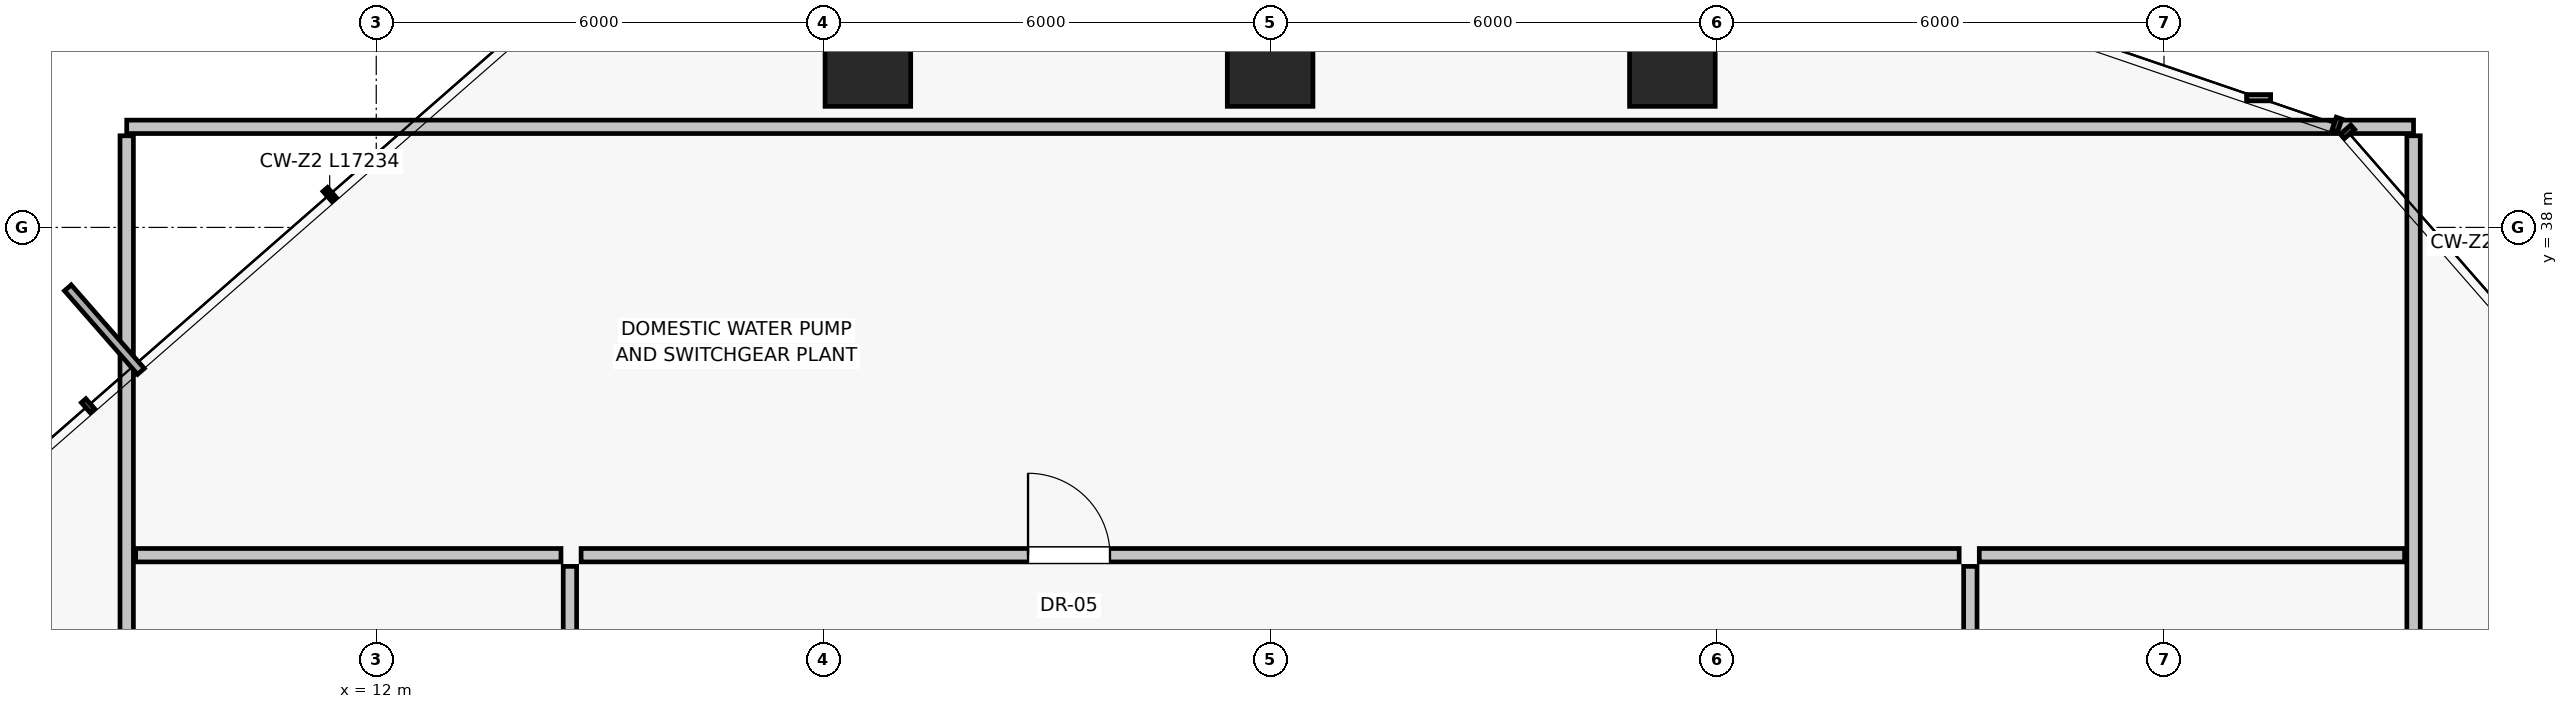
"""IFC4 building model, lengths in metres.
Left out: names, types, materials, properties, quantities, classifications, styles, units other than length and angle.
Written with IfcOpenShell. Run it as: python <this file> out.ifc"""

import sys

from ifc_helpers import new_model, si_unit, direction, frame, frame_2d, origin, origin_2d, place, context, subcontext, project, spatial, rectangle, extrude, source, transform, mapped, element, fill, save


model = new_model("IFC4")
c1 = context("Model", 3, precision=1e-05, world=origin(), true_north=direction((0.0, 1.0)))
c2 = subcontext(c1, "Body", "Model", "MODEL_VIEW")
j1 = project(units=[si_unit("LENGTHUNIT", "METRE"), si_unit("PLANEANGLEUNIT", "RADIAN")], contexts=[c1])
p1 = place(None, origin())
s1 = spatial("IfcSite", under=j1, at=p1, CompositionType="ELEMENT")
p2 = place(p1, origin())
s2 = spatial("IfcBuilding", under=s1, at=p2, CompositionType="ELEMENT")
p3 = place(p2, frame((0.0, 0.0, 169.55)))
s3 = spatial("IfcBuildingStorey", under=s2, at=p3, CompositionType="ELEMENT", Elevation=169.55)
for number, where, z_axis, x_axis in (
    (1, (29.4, 40.2, 0.0), (0.0, 0.0, 1.0), (1.0, 0.0, 0.0)),
    (2, (24.0, 40.2, 0.0), (0.0, 0.0, 1.0), (1.0, 0.0, 0.0)),
    (3, (18.6, 40.2, 0.0), (0.0, 0.0, 1.0), (1.0, 0.0, 0.0)),
):
    element("IfcColumn", number, at=place(p3, frame(where, z_axis=z_axis, x_axis=x_axis)), inside=s3, PredefinedType="COLUMN", context=c2, shape_type="SweptSolid", body=[
        extrude(rectangle(XDim=1.15, YDim=1.15, at=origin_2d()), origin(), (0.0, 0.0, 1.0), 4.8),
    ])
p4 = place(p3, frame((33.4, 14.35, 0.0), z_axis=(0.0, 0.0, 1.0), x_axis=(0.0, 1.0, 0.0)))
e4 = element("IfcWall", 4, at=p4, inside=s3, PredefinedType="PARTITIONING", context=c2, shape_type="SweptSolid", body=[
    extrude(rectangle(XDim=19.1, YDim=0.18, at=frame_2d((9.55, 0.0))), origin(), (0.0, 0.0, 1.0), 4.48),
])
p5 = place(p4, frame((6.0, 0.0, 0.0)))
e5 = element("IfcOpeningElement", 5, at=p5, cuts=e4, PredefinedType="OPENING", context=c2, shape_type="SweptSolid", body=[
    extrude(rectangle(XDim=1.1, YDim=2.03, at=frame_2d((0.55, 1.015))), frame((0.0, 0.1, 0.0), z_axis=(0.0, -1.0, 0.0), x_axis=(1.0, 0.0, 0.0)), (0.0, 0.0, 1.0), 0.2),
])
p6 = place(p3, frame((14.75, 33.6, 0.0), z_axis=(0.0, 0.0, 1.0), x_axis=(1.0, 0.0, 0.0)))
e6 = element("IfcWall", 6, at=p6, inside=s3, PredefinedType="PARTITIONING", context=c2, shape_type="SweptSolid", body=[
    extrude(rectangle(XDim=18.5, YDim=0.18, at=frame_2d((9.25, 0.0))), origin(), (0.0, 0.0, 1.0), 4.48),
])
p7 = place(p6, frame((6.0, 0.0, 0.0)))
e7 = element("IfcOpeningElement", 7, at=p7, cuts=e6, PredefinedType="OPENING", context=c2, shape_type="SweptSolid", body=[
    extrude(rectangle(XDim=1.1, YDim=2.03, at=frame_2d((0.55, 1.015))), frame((0.0, 0.1, 0.0), z_axis=(0.0, -1.0, 0.0), x_axis=(1.0, 0.0, 0.0)), (0.0, 0.0, 1.0), 0.2),
])
p8 = place(p3, frame((14.6, 14.35, 0.0), z_axis=(0.0, 0.0, 1.0), x_axis=(0.0, 1.0, 0.0)))
e8 = element("IfcWall", 8, at=p8, inside=s3, PredefinedType="PARTITIONING", context=c2, shape_type="SweptSolid", body=[
    extrude(rectangle(XDim=19.1, YDim=0.18, at=frame_2d((9.55, 0.0))), origin(), (0.0, 0.0, 1.0), 4.48),
])
p9 = place(p8, frame((6.0, 0.0, 0.0)))
e9 = element("IfcOpeningElement", 9, at=p9, cuts=e8, PredefinedType="OPENING", context=c2, shape_type="SweptSolid", body=[
    extrude(rectangle(XDim=1.3, YDim=2.3, at=frame_2d((0.65, 1.15))), frame((0.0, 0.1, 0.0), z_axis=(0.0, -1.0, 0.0), x_axis=(1.0, 0.0, 0.0)), (0.0, 0.0, 1.0), 0.2),
])
p10 = place(p3, frame((8.65, 39.35, 0.0), z_axis=(0.0, 0.0, 1.0), x_axis=(1.0, 0.0, 0.0)))
e10 = element("IfcWall", 10, at=p10, inside=s3, PredefinedType="PARTITIONING", context=c2, shape_type="SweptSolid", body=[
    extrude(rectangle(XDim=30.7, YDim=0.18, at=frame_2d((15.35, 0.0))), origin(), (0.0, 0.0, 1.0), 4.48),
])
for number, where, z_axis, x_axis in (
    (11, (8.65, 8.77, 0.0), (0.0, 0.0, 1.0), (0.0, 1.0, 0.0)),
    (12, (39.35, 8.77, 0.0), (0.0, 0.0, 1.0), (0.0, 1.0, 0.0)),
):
    element("IfcWall", number, at=place(p3, frame(where, z_axis=z_axis, x_axis=x_axis)), inside=s3, PredefinedType="PARTITIONING", context=c2, shape_type="SweptSolid", body=[
        extrude(rectangle(XDim=30.46, YDim=0.18, at=frame_2d((15.23, 0.0))), origin(), (0.0, 0.0, 1.0), 2.28),
    ])
for number, where, z_axis, x_axis in (
    (13, (8.77, 33.6, 0.0), (0.0, 0.0, 1.0), (1.0, 0.0, 0.0)),
    (14, (33.52, 33.6, 0.0), (0.0, 0.0, 1.0), (1.0, 0.0, 0.0)),
):
    element("IfcWall", number, at=place(p3, frame(where, z_axis=z_axis, x_axis=x_axis)), inside=s3, PredefinedType="PARTITIONING", context=c2, shape_type="SweptSolid", body=[
        extrude(rectangle(XDim=5.71, YDim=0.18, at=frame_2d((2.855, 0.0))), origin(), (0.0, 0.0, 1.0), 4.48),
    ])
m1 = source(origin(), c2, "Body", "SweptSolid", [
    extrude(rectangle(XDim=1.1, YDim=2.03, at=frame_2d((0.55, 1.015))), frame((0.0, 0.025, 0.0), z_axis=(0.0, -1.0, 0.0), x_axis=(1.0, 0.0, 0.0)), (0.0, 0.0, 1.0), 0.05),
])
p11 = place(p7, origin())
e15 = element("IfcDoor", 15, at=p11, inside=s3, OperationType="SINGLE_SWING_LEFT", PredefinedType="DOOR", context=c2, shape_type="MappedRepresentation", body=[
    mapped(m1, transform((0.0, 0.0, 0.0), scale=1.0)),
])
fill(e7, e15)
save(model, sys.argv[1])
